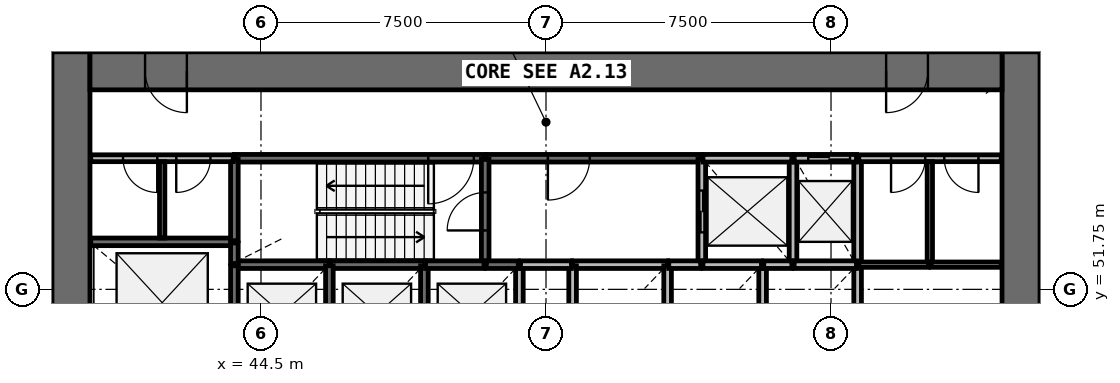
"""IFC4 building model, lengths in metres.
Left out: names, types, materials, properties, quantities, classifications, styles, units other than length and angle.
Written with IfcOpenShell. Run it as: python <this file> out.ifc"""

import sys

from ifc_helpers import new_model, si_unit, direction, frame, frame_2d, origin, place, context, subcontext, project, spatial, rectangle, extrude, source, transform, mapped, element, fill, save


model = new_model("IFC4")
c1 = context("Model", 3, precision=1e-05, world=origin(), true_north=direction((0.0, 1.0)))
c2 = subcontext(c1, "Body", "Model", "MODEL_VIEW")
j1 = project(units=[si_unit("LENGTHUNIT", "METRE"), si_unit("PLANEANGLEUNIT", "RADIAN")], contexts=[c1])
p1 = place(None, origin())
s1 = spatial("IfcSite", under=j1, at=p1, CompositionType="ELEMENT")
p2 = place(p1, origin())
s2 = spatial("IfcBuilding", under=s1, at=p2, CompositionType="ELEMENT")
p3 = place(p2, frame((0.0, 0.0, 53.4)))
s3 = spatial("IfcBuildingStorey", under=s2, at=p3, CompositionType="ELEMENT", Elevation=53.4)
p4 = place(p3, frame((64.5, 38.0, 0.0), z_axis=(0.0, 0.0, 1.0), x_axis=(0.0, 1.0, 0.0)))
e1 = element("IfcWall", 1, at=p4, inside=s3, PredefinedType="SHEAR", context=c2, shape_type="SweptSolid", body=[
    extrude(rectangle(XDim=20.0, YDim=1.0, at=frame_2d((10.0, 0.0))), origin(), (0.0, 0.0, 1.0), 4.4),
])
p5 = place(p4, frame((9.1, 0.0, 0.0)))
e2 = element("IfcOpeningElement", 2, at=p5, cuts=e1, PredefinedType="OPENING", context=c2, shape_type="SweptSolid", body=[
    extrude(rectangle(XDim=1.8, YDim=2.1, at=frame_2d((0.9, 1.05))), frame((0.0, 0.51, 0.0), z_axis=(0.0, -1.0, 0.0), x_axis=(1.0, 0.0, 0.0)), (0.0, 0.0, 1.0), 1.02),
])
p6 = place(p3, frame((39.5, 58.0, 0.0), z_axis=(0.0, 0.0, 1.0), x_axis=(0.0, -1.0, 0.0)))
e3 = element("IfcWall", 3, at=p6, inside=s3, PredefinedType="SHEAR", context=c2, shape_type="SweptSolid", body=[
    extrude(rectangle(XDim=20.0, YDim=1.0, at=frame_2d((10.0, 0.0))), origin(), (0.0, 0.0, 1.0), 4.4),
])
p7 = place(p6, frame((9.1, 0.0, 0.0)))
e4 = element("IfcOpeningElement", 4, at=p7, cuts=e3, PredefinedType="OPENING", context=c2, shape_type="SweptSolid", body=[
    extrude(rectangle(XDim=1.8, YDim=2.1, at=frame_2d((0.9, 1.05))), frame((0.0, 0.51, 0.0), z_axis=(0.0, -1.0, 0.0), x_axis=(1.0, 0.0, 0.0)), (0.0, 0.0, 1.0), 1.02),
])
p8 = place(p3, frame((64.0, 57.5, 0.0), z_axis=(0.0, 0.0, 1.0), x_axis=(-1.0, 0.0, 0.0)))
e5 = element("IfcWall", 5, at=p8, inside=s3, PredefinedType="SHEAR", context=c2, shape_type="SweptSolid", body=[
    extrude(rectangle(XDim=24.0, YDim=1.0, at=frame_2d((12.0, 0.0))), origin(), (0.0, 0.0, 1.0), 4.4),
])
p9 = place(p8, frame((21.45, 0.0, 0.0)))
e6 = element("IfcOpeningElement", 6, at=p9, cuts=e5, PredefinedType="OPENING", context=c2, shape_type="SweptSolid", body=[
    extrude(rectangle(XDim=1.1, YDim=2.1, at=frame_2d((0.55, 1.05))), frame((0.0, 0.51, 0.0), z_axis=(0.0, -1.0, 0.0), x_axis=(1.0, 0.0, 0.0)), (0.0, 0.0, 1.0), 1.02),
])
p10 = place(p8, frame((1.95, 0.0, 0.0)))
e7 = element("IfcOpeningElement", 7, at=p10, cuts=e5, PredefinedType="OPENING", context=c2, shape_type="SweptSolid", body=[
    extrude(rectangle(XDim=1.1, YDim=2.1, at=frame_2d((0.55, 1.05))), frame((0.0, 0.51, 0.0), z_axis=(0.0, -1.0, 0.0), x_axis=(1.0, 0.0, 0.0)), (0.0, 0.0, 1.0), 1.02),
])
p11 = place(p3, frame((50.4, 55.2, 0.0), z_axis=(0.0, 0.0, 1.0), x_axis=(-1.0, 0.0, 0.0)))
e8 = element("IfcWall", 8, at=p11, inside=s3, PredefinedType="SOLIDWALL", context=c2, shape_type="SweptSolid", body=[
    extrude(rectangle(XDim=6.6, YDim=0.2, at=frame_2d((3.3, 0.0))), origin(), (0.0, 0.0, 1.0), 3.95),
])
p12 = place(p11, frame((0.3, 0.0, 0.0)))
e9 = element("IfcOpeningElement", 9, at=p12, cuts=e8, PredefinedType="OPENING", context=c2, shape_type="SweptSolid", body=[
    extrude(rectangle(XDim=1.2, YDim=2.1, at=frame_2d((0.6, 1.05))), frame((0.0, 0.11, 0.0), z_axis=(0.0, -1.0, 0.0), x_axis=(1.0, 0.0, 0.0)), (0.0, 0.0, 1.0), 0.22),
])
p13 = place(p3, frame((56.1, 55.2, 0.0), z_axis=(0.0, 0.0, 1.0), x_axis=(-1.0, 0.0, 0.0)))
e10 = element("IfcWall", 10, at=p13, inside=s3, PredefinedType="SOLIDWALL", context=c2, shape_type="SweptSolid", body=[
    extrude(rectangle(XDim=5.67, YDim=0.2, at=frame_2d((2.835, 0.0))), origin(), (0.0, 0.0, 1.0), 3.95),
])
p14 = place(p13, frame((2.95, 0.0, 0.0)))
e11 = element("IfcOpeningElement", 11, at=p14, cuts=e10, PredefinedType="OPENING", context=c2, shape_type="SweptSolid", body=[
    extrude(rectangle(XDim=1.1, YDim=2.1, at=frame_2d((0.55, 1.05))), frame((0.0, 0.11, 0.0), z_axis=(0.0, -1.0, 0.0), x_axis=(1.0, 0.0, 0.0)), (0.0, 0.0, 1.0), 0.22),
])
p15 = place(p3, frame((43.8, 53.0, 0.0), z_axis=(0.0, 0.0, 1.0), x_axis=(-1.0, 0.0, 0.0)))
e12 = element("IfcWall", 12, at=p15, inside=s3, PredefinedType="SOLIDWALL", context=c2, shape_type="SweptSolid", body=[
    extrude(rectangle(XDim=3.78, YDim=0.2, at=frame_2d((1.89, 0.0))), origin(), (0.0, 0.0, 1.0), 3.95),
])
p16 = place(p3, frame((50.4, 52.4, 0.0), z_axis=(0.0, 0.0, 1.0), x_axis=(0.0, 1.0, 0.0)))
e13 = element("IfcWall", 13, at=p16, inside=s3, PredefinedType="SOLIDWALL", context=c2, shape_type="SweptSolid", body=[
    extrude(rectangle(XDim=2.77, YDim=0.2, at=frame_2d((1.385, 0.0))), origin(), (0.0, 0.0, 1.0), 3.95),
])
p17 = place(p16, frame((0.9, 0.0, 0.0)))
e14 = element("IfcOpeningElement", 14, at=p17, cuts=e13, PredefinedType="OPENING", context=c2, shape_type="SweptSolid", body=[
    extrude(rectangle(XDim=1.0, YDim=2.1, at=frame_2d((0.5, 1.05))), frame((0.0, 0.11, 0.0), z_axis=(0.0, -1.0, 0.0), x_axis=(1.0, 0.0, 0.0)), (0.0, 0.0, 1.0), 0.22),
])
p18 = place(p3, frame((56.1, 55.17, 0.0), z_axis=(0.0, 0.0, 1.0), x_axis=(0.0, -1.0, 0.0)))
e15 = element("IfcWall", 15, at=p18, inside=s3, PredefinedType="SOLIDWALL", context=c2, shape_type="SweptSolid", body=[
    extrude(rectangle(XDim=2.77, YDim=0.2, at=frame_2d((1.385, 0.0))), origin(), (0.0, 0.0, 1.0), 3.95),
])
p19 = place(p18, frame((0.82, 0.0, 0.0)))
e16 = element("IfcOpeningElement", 16, at=p19, cuts=e15, PredefinedType="OPENING", context=c2, shape_type="SweptSolid", body=[
    extrude(rectangle(XDim=1.1, YDim=2.1, at=frame_2d((0.55, 1.05))), frame((0.0, 0.11, 0.0), z_axis=(0.0, -1.0, 0.0), x_axis=(1.0, 0.0, 0.0)), (0.0, 0.0, 1.0), 0.22),
])
for number, where, z_axis, x_axis in (
    (17, (58.5, 52.4, 0.0), (0.0, 0.0, 1.0), (0.0, 1.0, 0.0)),
    (18, (60.2, 52.4, 0.0), (0.0, 0.0, 1.0), (0.0, 1.0, 0.0)),
):
    element("IfcWall", number, at=place(p3, frame(where, z_axis=z_axis, x_axis=x_axis)), inside=s3, PredefinedType="SOLIDWALL", context=c2, shape_type="SweptSolid", body=[
        extrude(rectangle(XDim=2.8, YDim=0.2, at=frame_2d((1.4, 0.0))), origin(), (0.0, 0.0, 1.0), 3.95),
    ])
p20 = place(p3, frame((46.3, 52.4, 0.0), z_axis=(0.0, 0.0, 1.0), x_axis=(-1.0, 0.0, 0.0)))
e19 = element("IfcWall", 19, at=p20, inside=s3, PredefinedType="SOLIDWALL", context=c2, shape_type="SweptSolid", body=[
    extrude(rectangle(XDim=2.5, YDim=0.2, at=frame_2d((1.25, 0.0))), origin(), (0.0, 0.0, 1.0), 3.95),
])
p21 = place(p3, frame((48.8, 52.4, 0.0), z_axis=(0.0, 0.0, 1.0), x_axis=(-1.0, 0.0, 0.0)))
e20 = element("IfcWall", 20, at=p21, inside=s3, PredefinedType="SOLIDWALL", context=c2, shape_type="SweptSolid", body=[
    extrude(rectangle(XDim=2.47, YDim=0.2, at=frame_2d((1.235, 0.0))), origin(), (0.0, 0.0, 1.0), 3.95),
])
p22 = place(p3, frame((55.2, 52.4, 0.0), z_axis=(0.0, 0.0, 1.0), x_axis=(-1.0, 0.0, 0.0)))
e21 = element("IfcWall", 21, at=p22, inside=s3, PredefinedType="SOLIDWALL", context=c2, shape_type="SweptSolid", body=[
    extrude(rectangle(XDim=2.5, YDim=0.2, at=frame_2d((1.25, 0.0))), origin(), (0.0, 0.0, 1.0), 3.95),
])
p23 = place(p3, frame((58.47, 55.2, 0.0), z_axis=(0.0, 0.0, 1.0), x_axis=(-1.0, 0.0, 0.0)))
e22 = element("IfcWall", 22, at=p23, inside=s3, PredefinedType="SOLIDWALL", context=c2, shape_type="SweptSolid", body=[
    extrude(rectangle(XDim=2.34, YDim=0.2, at=frame_2d((1.17, 0.0))), origin(), (0.0, 0.0, 1.0), 3.95),
])
for number, where, z_axis, x_axis in (
    (23, (43.8, 52.37, 0.0), (0.0, 0.0, 1.0), (0.0, -1.0, 0.0)),
    (24, (46.3, 50.01, 0.0), (0.0, 0.0, 1.0), (0.0, 1.0, 0.0)),
    (25, (48.8, 50.01, 0.0), (0.0, 0.0, 1.0), (0.0, 1.0, 0.0)),
):
    element("IfcWall", number, at=place(p3, frame(where, z_axis=z_axis, x_axis=x_axis)), inside=s3, PredefinedType="SOLIDWALL", context=c2, shape_type="SweptSolid", body=[
        extrude(rectangle(XDim=2.36, YDim=0.2, at=frame_2d((1.18, 0.0))), origin(), (0.0, 0.0, 1.0), 3.95),
    ])
p24 = place(p3, frame((51.3, 50.01, 0.0), z_axis=(0.0, 0.0, 1.0), x_axis=(0.0, 1.0, 0.0)))
e26 = element("IfcWall", 26, at=p24, inside=s3, PredefinedType="SOLIDWALL", context=c2, shape_type="SweptSolid", body=[
    extrude(rectangle(XDim=2.39, YDim=0.2, at=frame_2d((1.195, 0.0))), origin(), (0.0, 0.0, 1.0), 3.95),
])
for number, where, z_axis, x_axis in (
    (27, (52.7, 52.37, 0.0), (0.0, 0.0, 1.0), (0.0, -1.0, 0.0)),
    (28, (55.2, 50.01, 0.0), (0.0, 0.0, 1.0), (0.0, 1.0, 0.0)),
):
    element("IfcWall", number, at=place(p3, frame(where, z_axis=z_axis, x_axis=x_axis)), inside=s3, PredefinedType="SOLIDWALL", context=c2, shape_type="SweptSolid", body=[
        extrude(rectangle(XDim=2.36, YDim=0.2, at=frame_2d((1.18, 0.0))), origin(), (0.0, 0.0, 1.0), 3.95),
    ])
p25 = place(p3, frame((57.7, 50.01, 0.0), z_axis=(0.0, 0.0, 1.0), x_axis=(0.0, 1.0, 0.0)))
e29 = element("IfcWall", 29, at=p25, inside=s3, PredefinedType="SOLIDWALL", context=c2, shape_type="SweptSolid", body=[
    extrude(rectangle(XDim=2.39, YDim=0.2, at=frame_2d((1.195, 0.0))), origin(), (0.0, 0.0, 1.0), 3.95),
])
p26 = place(p3, frame((60.2, 50.01, 0.0), z_axis=(0.0, 0.0, 1.0), x_axis=(0.0, 1.0, 0.0)))
e30 = element("IfcWall", 30, at=p26, inside=s3, PredefinedType="SOLIDWALL", context=c2, shape_type="SweptSolid", body=[
    extrude(rectangle(XDim=2.36, YDim=0.2, at=frame_2d((1.18, 0.0))), origin(), (0.0, 0.0, 1.0), 3.95),
])
p27 = place(p3, frame((43.8, 55.17, 0.0), z_axis=(0.0, 0.0, 1.0), x_axis=(0.0, -1.0, 0.0)))
e31 = element("IfcWall", 31, at=p27, inside=s3, PredefinedType="SOLIDWALL", context=c2, shape_type="SweptSolid", body=[
    extrude(rectangle(XDim=2.14, YDim=0.2, at=frame_2d((1.07, 0.0))), origin(), (0.0, 0.0, 1.0), 3.95),
])
p28 = place(p3, frame((60.17, 52.4, 0.0), z_axis=(0.0, 0.0, 1.0), x_axis=(-1.0, 0.0, 0.0)))
e32 = element("IfcWall", 32, at=p28, inside=s3, PredefinedType="SOLIDWALL", context=c2, shape_type="SweptSolid", body=[
    extrude(rectangle(XDim=1.64, YDim=0.2, at=frame_2d((0.82, 0.0))), origin(), (0.0, 0.0, 1.0), 3.95),
])
p29 = place(p3, frame((60.17, 55.2, 0.0), z_axis=(0.0, 0.0, 1.0), x_axis=(-1.0, 0.0, 0.0)))
e33 = element("IfcWall", 33, at=p29, inside=s3, PredefinedType="SOLIDWALL", context=c2, shape_type="SweptSolid", body=[
    extrude(rectangle(XDim=1.64, YDim=0.2, at=frame_2d((0.82, 0.0))), origin(), (0.0, 0.0, 1.0), 3.95),
])
p30 = place(p29, frame((0.17, 0.0, 0.0)))
e34 = element("IfcOpeningElement", 34, at=p30, cuts=e33, PredefinedType="OPENING", context=c2, shape_type="SweptSolid", body=[
    extrude(rectangle(XDim=1.1, YDim=2.1, at=frame_2d((0.55, 1.05))), frame((0.0, 0.11, 0.0), z_axis=(0.0, -1.0, 0.0), x_axis=(1.0, 0.0, 0.0)), (0.0, 0.0, 1.0), 0.22),
])
for number, where, z_axis, x_axis in (
    (35, (50.37, 52.4, 0.0), (0.0, 0.0, 1.0), (-1.0, 0.0, 0.0)),
    (36, (57.67, 52.4, 0.0), (0.0, 0.0, 1.0), (-1.0, 0.0, 0.0)),
):
    element("IfcWall", number, at=place(p3, frame(where, z_axis=z_axis, x_axis=x_axis)), inside=s3, PredefinedType="SOLIDWALL", context=c2, shape_type="SweptSolid", body=[
        extrude(rectangle(XDim=1.54, YDim=0.2, at=frame_2d((0.77, 0.0))), origin(), (0.0, 0.0, 1.0), 3.95),
    ])
p31 = place(p3, frame((51.33, 52.4, 0.0), z_axis=(0.0, 0.0, 1.0), x_axis=(1.0, 0.0, 0.0)))
e37 = element("IfcWall", 37, at=p31, inside=s3, PredefinedType="SOLIDWALL", context=c2, shape_type="SweptSolid", body=[
    extrude(rectangle(XDim=1.34, YDim=0.2, at=frame_2d((0.67, 0.0))), origin(), (0.0, 0.0, 1.0), 3.95),
])
for number, where, z_axis, x_axis in (
    (38, (51.27, 52.4, 0.0), (0.0, 0.0, 1.0), (-1.0, 0.0, 0.0)),
    (39, (56.07, 52.4, 0.0), (0.0, 0.0, 1.0), (-1.0, 0.0, 0.0)),
):
    element("IfcWall", number, at=place(p3, frame(where, z_axis=z_axis, x_axis=x_axis)), inside=s3, PredefinedType="SOLIDWALL", context=c2, shape_type="SweptSolid", body=[
        extrude(rectangle(XDim=0.84, YDim=0.2, at=frame_2d((0.42, 0.0))), origin(), (0.0, 0.0, 1.0), 3.95),
    ])
p32 = place(p3, frame((58.47, 52.4, 0.0), z_axis=(0.0, 0.0, 1.0), x_axis=(-1.0, 0.0, 0.0)))
e40 = element("IfcWall", 40, at=p32, inside=s3, PredefinedType="SOLIDWALL", context=c2, shape_type="SweptSolid", body=[
    extrude(rectangle(XDim=0.74, YDim=0.2, at=frame_2d((0.37, 0.0))), origin(), (0.0, 0.0, 1.0), 3.95),
])
p33 = place(p3, frame((43.8, 52.43, 0.0), z_axis=(0.0, 0.0, 1.0), x_axis=(0.0, 1.0, 0.0)))
e41 = element("IfcWall", 41, at=p33, inside=s3, PredefinedType="SOLIDWALL", context=c2, shape_type="SweptSolid", body=[
    extrude(rectangle(XDim=0.54, YDim=0.2, at=frame_2d((0.27, 0.0))), origin(), (0.0, 0.0, 1.0), 3.95),
])
p34 = place(p3, frame((43.77, 55.2, 0.0), z_axis=(0.0, 0.0, 1.0), x_axis=(-1.0, 0.0, 0.0)))
e42 = element("IfcWall", 42, at=p34, inside=s3, PredefinedType="PARTITIONING", context=c2, shape_type="SweptSolid", body=[
    extrude(rectangle(XDim=3.75, YDim=0.18, at=frame_2d((1.875, 0.0))), origin(), (0.0, 0.0, 1.0), 3.95),
])
p35 = place(p34, frame((2.0, 0.0, 0.0)))
e43 = element("IfcOpeningElement", 43, at=p35, cuts=e42, PredefinedType="OPENING", context=c2, shape_type="SweptSolid", body=[
    extrude(rectangle(XDim=0.9, YDim=2.1, at=frame_2d((0.45, 1.05))), frame((0.0, 0.1, 0.0), z_axis=(0.0, -1.0, 0.0), x_axis=(1.0, 0.0, 0.0)), (0.0, 0.0, 1.0), 0.2),
])
p36 = place(p34, frame((0.6, 0.0, 0.0)))
e44 = element("IfcOpeningElement", 44, at=p36, cuts=e42, PredefinedType="OPENING", context=c2, shape_type="SweptSolid", body=[
    extrude(rectangle(XDim=0.9, YDim=2.1, at=frame_2d((0.45, 1.05))), frame((0.0, 0.1, 0.0), z_axis=(0.0, -1.0, 0.0), x_axis=(1.0, 0.0, 0.0)), (0.0, 0.0, 1.0), 0.2),
])
p37 = place(p3, frame((63.98, 55.2, 0.0), z_axis=(0.0, 0.0, 1.0), x_axis=(-1.0, 0.0, 0.0)))
e45 = element("IfcWall", 45, at=p37, inside=s3, PredefinedType="PARTITIONING", context=c2, shape_type="SweptSolid", body=[
    extrude(rectangle(XDim=3.75, YDim=0.18, at=frame_2d((1.875, 0.0))), origin(), (0.0, 0.0, 1.0), 3.95),
])
p38 = place(p37, frame((2.0, 0.0, 0.0)))
e46 = element("IfcOpeningElement", 46, at=p38, cuts=e45, PredefinedType="OPENING", context=c2, shape_type="SweptSolid", body=[
    extrude(rectangle(XDim=0.9, YDim=2.1, at=frame_2d((0.45, 1.05))), frame((0.0, 0.1, 0.0), z_axis=(0.0, -1.0, 0.0), x_axis=(1.0, 0.0, 0.0)), (0.0, 0.0, 1.0), 0.2),
])
p39 = place(p37, frame((0.6, 0.0, 0.0)))
e47 = element("IfcOpeningElement", 47, at=p39, cuts=e45, PredefinedType="OPENING", context=c2, shape_type="SweptSolid", body=[
    extrude(rectangle(XDim=0.9, YDim=2.1, at=frame_2d((0.45, 1.05))), frame((0.0, 0.1, 0.0), z_axis=(0.0, -1.0, 0.0), x_axis=(1.0, 0.0, 0.0)), (0.0, 0.0, 1.0), 0.2),
])
p40 = place(p3, frame((62.1, 52.4, 0.0), z_axis=(0.0, 0.0, 1.0), x_axis=(0.0, 1.0, 0.0)))
e48 = element("IfcWall", 48, at=p40, inside=s3, PredefinedType="PARTITIONING", context=c2, shape_type="SweptSolid", body=[
    extrude(rectangle(XDim=2.71, YDim=0.14, at=frame_2d((1.355, 0.0))), origin(), (0.0, 0.0, 1.0), 3.05),
])
p41 = place(p3, frame((41.9, 53.1, 0.0), z_axis=(0.0, 0.0, 1.0), x_axis=(0.0, 1.0, 0.0)))
e49 = element("IfcWall", 49, at=p41, inside=s3, PredefinedType="PARTITIONING", context=c2, shape_type="SweptSolid", body=[
    extrude(rectangle(XDim=2.01, YDim=0.14, at=frame_2d((1.005, 0.0))), origin(), (0.0, 0.0, 1.0), 3.05),
])
p42 = place(p3, frame((62.07, 52.4, 0.0), z_axis=(0.0, 0.0, 1.0), x_axis=(-1.0, 0.0, 0.0)))
e50 = element("IfcWall", 50, at=p42, inside=s3, PredefinedType="PARTITIONING", context=c2, shape_type="SweptSolid", body=[
    extrude(rectangle(XDim=1.84, YDim=0.14, at=frame_2d((0.92, 0.0))), origin(), (0.0, 0.0, 1.0), 3.05),
])
p43 = place(p3, frame((63.98, 52.4, 0.0), z_axis=(0.0, 0.0, 1.0), x_axis=(-1.0, 0.0, 0.0)))
e51 = element("IfcWall", 51, at=p43, inside=s3, PredefinedType="PARTITIONING", context=c2, shape_type="SweptSolid", body=[
    extrude(rectangle(XDim=1.85, YDim=0.14, at=frame_2d((0.925, 0.0))), origin(), (0.0, 0.0, 1.0), 3.05),
])
m1 = source(origin(), c2, "Body", "SweptSolid", [
    extrude(rectangle(XDim=1.1, YDim=2.1, at=frame_2d((0.55, 1.05))), frame((0.0, 0.025, 0.0), z_axis=(0.0, -1.0, 0.0), x_axis=(1.0, 0.0, 0.0)), (0.0, 0.0, 1.0), 0.05),
])
p44 = place(p19, origin())
e52 = element("IfcDoor", 52, at=p44, inside=s3, OperationType="DOUBLE_DOOR_SLIDING", PredefinedType="USERDEFINED", context=c2, shape_type="MappedRepresentation", body=[
    mapped(m1, transform((0.0, 0.0, 0.0), scale=1.0)),
])
fill(e16, e52)
p45 = place(p30, origin())
e53 = element("IfcDoor", 53, at=p45, inside=s3, OperationType="DOUBLE_DOOR_SLIDING", PredefinedType="USERDEFINED", context=c2, shape_type="MappedRepresentation", body=[
    mapped(m1, transform((0.0, 0.0, 0.0), scale=1.0)),
])
fill(e34, e53)
m2 = source(origin(), c2, "Body", "SweptSolid", [
    extrude(rectangle(XDim=1.2, YDim=2.1, at=frame_2d((0.6, 1.05))), frame((0.0, 0.025, 0.0), z_axis=(0.0, -1.0, 0.0), x_axis=(1.0, 0.0, 0.0)), (0.0, 0.0, 1.0), 0.05),
])
p46 = place(p12, origin())
e54 = element("IfcDoor", 54, at=p46, inside=s3, OperationType="SINGLE_SWING_RIGHT", PredefinedType="DOOR", context=c2, shape_type="MappedRepresentation", body=[
    mapped(m2, transform((0.0, 0.0, 0.0), scale=1.0)),
])
fill(e9, e54)
m3 = source(origin(), c2, "Body", "SweptSolid", [
    extrude(rectangle(XDim=1.0, YDim=2.1, at=frame_2d((0.5, 1.05))), frame((0.0, 0.025, 0.0), z_axis=(0.0, -1.0, 0.0), x_axis=(1.0, 0.0, 0.0)), (0.0, 0.0, 1.0), 0.05),
])
p47 = place(p17, origin())
e55 = element("IfcDoor", 55, at=p47, inside=s3, OperationType="SINGLE_SWING_LEFT", PredefinedType="DOOR", context=c2, shape_type="MappedRepresentation", body=[
    mapped(m3, transform((0.0, 0.0, 0.0), scale=1.0)),
])
fill(e14, e55)
m4 = source(origin(), c2, "Body", "SweptSolid", [
    extrude(rectangle(XDim=1.1, YDim=2.1, at=frame_2d((0.55, 1.05))), frame((0.0, 0.025, 0.0), z_axis=(0.0, -1.0, 0.0), x_axis=(1.0, 0.0, 0.0)), (0.0, 0.0, 1.0), 0.05),
])
p48 = place(p14, origin())
e56 = element("IfcDoor", 56, at=p48, inside=s3, OperationType="SINGLE_SWING_RIGHT", PredefinedType="DOOR", context=c2, shape_type="MappedRepresentation", body=[
    mapped(m4, transform((0.0, 0.0, 0.0), scale=1.0)),
])
fill(e11, e56)
m5 = source(origin(), c2, "Body", "SweptSolid", [
    extrude(rectangle(XDim=1.1, YDim=2.1, at=frame_2d((0.55, 1.05))), frame((0.0, 0.025, 0.0), z_axis=(0.0, -1.0, 0.0), x_axis=(1.0, 0.0, 0.0)), (0.0, 0.0, 1.0), 0.05),
])
p49 = place(p9, origin())
e57 = element("IfcDoor", 57, at=p49, inside=s3, OperationType="SINGLE_SWING_LEFT", PredefinedType="DOOR", context=c2, shape_type="MappedRepresentation", body=[
    mapped(m5, transform((0.0, 0.0, 0.0), scale=1.0)),
])
fill(e6, e57)
p50 = place(p10, origin())
e58 = element("IfcDoor", 58, at=p50, inside=s3, OperationType="SINGLE_SWING_RIGHT", PredefinedType="DOOR", context=c2, shape_type="MappedRepresentation", body=[
    mapped(m5, transform((0.0, 0.0, 0.0), scale=1.0)),
])
fill(e7, e58)
m6 = source(origin(), c2, "Body", "SweptSolid", [
    extrude(rectangle(XDim=0.9, YDim=2.1, at=frame_2d((0.45, 1.05))), frame((0.0, 0.025, 0.0), z_axis=(0.0, -1.0, 0.0), x_axis=(1.0, 0.0, 0.0)), (0.0, 0.0, 1.0), 0.05),
])
p51 = place(p35, origin())
e59 = element("IfcDoor", 59, at=p51, inside=s3, OperationType="SINGLE_SWING_LEFT", PredefinedType="DOOR", context=c2, shape_type="MappedRepresentation", body=[
    mapped(m6, transform((0.0, 0.0, 0.0), scale=1.0)),
])
fill(e43, e59)
p52 = place(p36, origin())
e60 = element("IfcDoor", 60, at=p52, inside=s3, OperationType="SINGLE_SWING_RIGHT", PredefinedType="DOOR", context=c2, shape_type="MappedRepresentation", body=[
    mapped(m6, transform((0.0, 0.0, 0.0), scale=1.0)),
])
fill(e44, e60)
p53 = place(p38, origin())
e61 = element("IfcDoor", 61, at=p53, inside=s3, OperationType="SINGLE_SWING_RIGHT", PredefinedType="DOOR", context=c2, shape_type="MappedRepresentation", body=[
    mapped(m6, transform((0.0, 0.0, 0.0), scale=1.0)),
])
fill(e46, e61)
p54 = place(p39, origin())
e62 = element("IfcDoor", 62, at=p54, inside=s3, OperationType="SINGLE_SWING_LEFT", PredefinedType="DOOR", context=c2, shape_type="MappedRepresentation", body=[
    mapped(m6, transform((0.0, 0.0, 0.0), scale=1.0)),
])
fill(e47, e62)
save(model, sys.argv[1])
